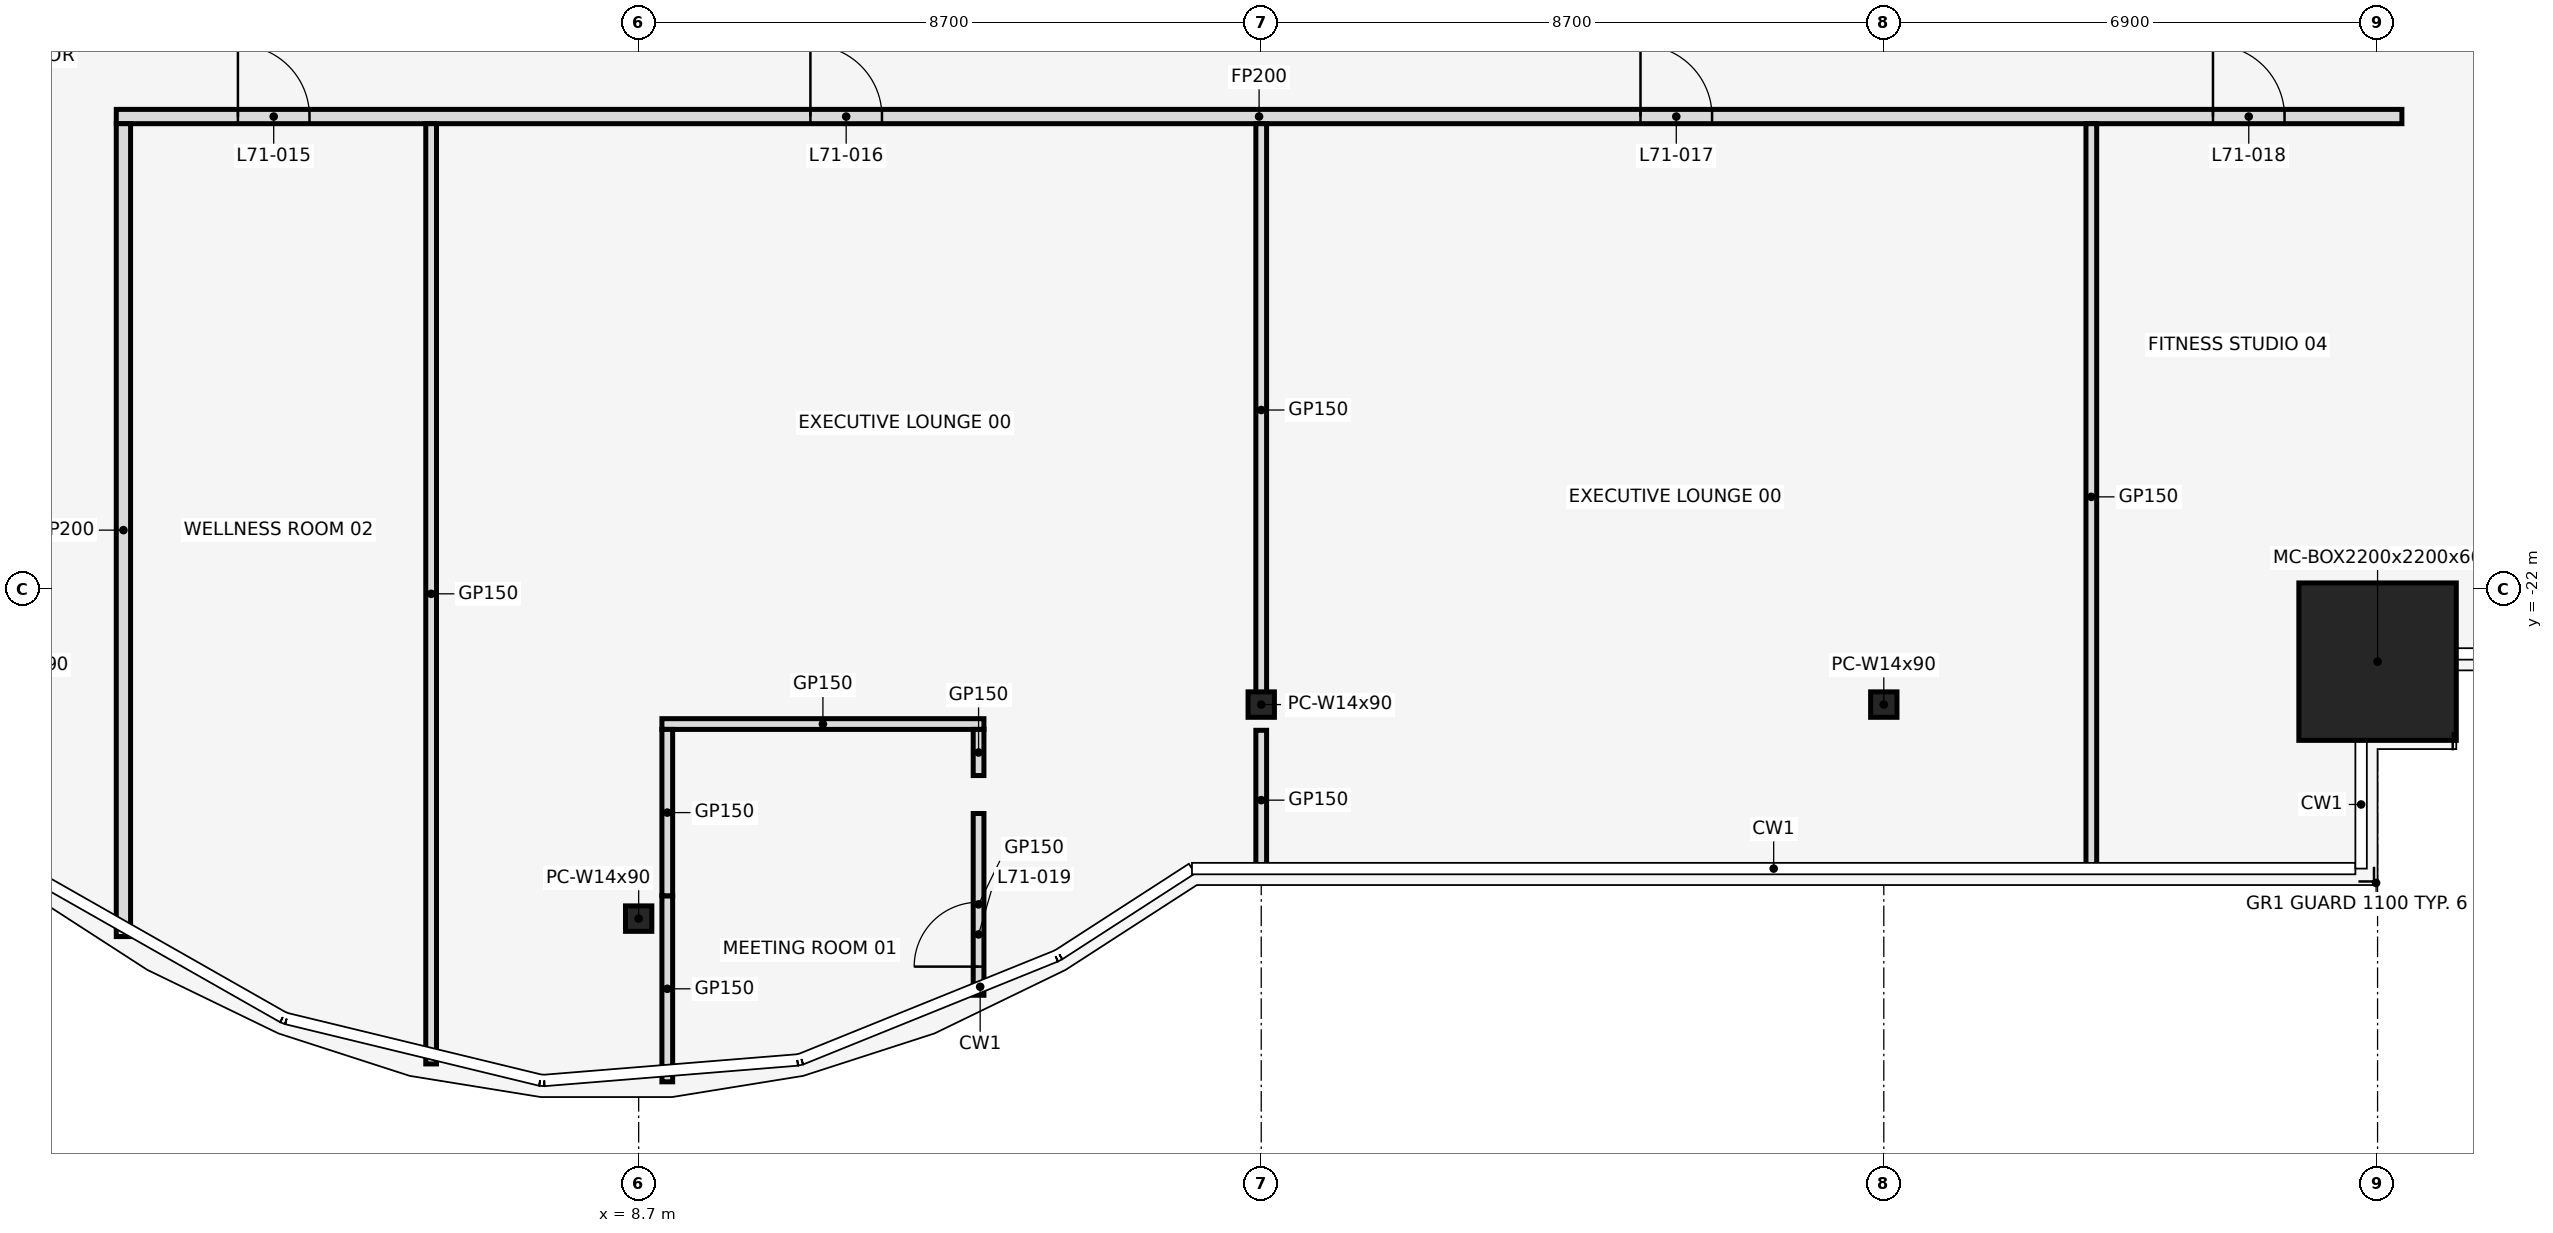
"""IFC4 building model, lengths in metres.
Left out: names, types, materials, properties, quantities, classifications, styles, units other than length and angle.
Written with IfcOpenShell. Run it as: python <this file> out.ifc"""

import sys

from ifc_helpers import new_model, si_unit, direction, frame, frame_2d, origin, origin_2d, place, context, subcontext, project, spatial, rectangle, hollow_rectangle, i_section, extrude, element, fill, save


model = new_model("IFC4")
c1 = context("Model", 3, precision=1e-05, world=origin(), true_north=direction((0.0, 1.0)))
c2 = subcontext(c1, "Body", "Model", "MODEL_VIEW")
j1 = project(units=[si_unit("LENGTHUNIT", "METRE"), si_unit("PLANEANGLEUNIT", "RADIAN")], contexts=[c1])
p1 = place(None, origin())
s1 = spatial("IfcSite", under=j1, at=p1, CompositionType="ELEMENT")
p2 = place(p1, origin())
s2 = spatial("IfcBuilding", under=s1, at=p2, CompositionType="ELEMENT")
p3 = place(p2, frame((0.0, 0.0, 315.5)))
s3 = spatial("IfcBuildingStorey", under=s2, at=p3, CompositionType="ELEMENT", Elevation=315.5)
for number, where, z_axis, x_axis in (
    (1, (8.7, -26.609, 0.0), (0.0, 0.0, 1.0), (1.0, 0.0, 0.0)),
    (2, (17.4, -23.618, 0.0), (0.0, 0.0, 1.0), (1.0, 0.0, 0.0)),
    (3, (26.1, -23.618, 0.0), (0.0, 0.0, 1.0), (1.0, 0.0, 0.0)),
):
    element("IfcColumn", number, at=place(p3, frame(where, z_axis=z_axis, x_axis=x_axis)), inside=s3, PredefinedType="COLUMN", context=c2, shape_type="SweptSolid", body=[
        extrude(i_section(OverallWidth=0.368, OverallDepth=0.356, WebThickness=0.011, FlangeThickness=0.018, at=origin_2d()), origin(), (0.0, 0.0, 1.0), 4.5),
    ])
p4 = place(p3, frame((33.0, -23.018, 0.0), z_axis=(0.0, 0.0, 1.0), x_axis=(1.0, 0.0, 0.0)))
e4 = element("IfcColumn", 4, at=p4, inside=s3, PredefinedType="COLUMN", context=c2, shape_type="SweptSolid", body=[
    extrude(hollow_rectangle(XDim=2.2, YDim=2.2, WallThickness=0.06, at=origin_2d()), origin(), (0.0, 0.0, 1.0), 4.5),
])
p5 = place(p3, frame((9.025, -23.89, 0.0), z_axis=(0.0, 0.0, 1.0), x_axis=(1.0, 0.0, 0.0)))
e5 = element("IfcWall", 5, at=p5, inside=s3, PredefinedType="PARTITIONING", context=c2, shape_type="SweptSolid", body=[
    extrude(rectangle(XDim=4.5, YDim=0.15, at=frame_2d((2.25, 0.0))), origin(), (0.0, 0.0, 1.0), 3.418),
])
p6 = place(p3, frame((1.4, -15.4, 0.0), z_axis=(0.0, 0.0, 1.0), x_axis=(1.0, 0.0, 0.0)))
e6 = element("IfcWall", 6, at=p6, inside=s3, PredefinedType="PARTITIONING", context=c2, shape_type="SweptSolid", body=[
    extrude(rectangle(XDim=31.94, YDim=0.2, at=frame_2d((15.97, 0.0))), origin(), (0.0, 0.0, 1.0), 3.418),
])
p7 = place(p6, frame((1.7, 0.0, 0.0)))
e7 = element("IfcOpeningElement", 7, at=p7, cuts=e6, PredefinedType="OPENING", context=c2, shape_type="SweptSolid", body=[
    extrude(rectangle(XDim=1.0, YDim=2.1, at=frame_2d((0.5, 1.05))), frame((0.0, 0.112, 0.0), z_axis=(0.0, -1.0, 0.0), x_axis=(1.0, 0.0, 0.0)), (0.0, 0.0, 1.0), 0.224),
])
p8 = place(p6, frame((9.7, 0.0, 0.0)))
e8 = element("IfcOpeningElement", 8, at=p8, cuts=e6, PredefinedType="OPENING", context=c2, shape_type="SweptSolid", body=[
    extrude(rectangle(XDim=1.0, YDim=2.1, at=frame_2d((0.5, 1.05))), frame((0.0, 0.112, 0.0), z_axis=(0.0, -1.0, 0.0), x_axis=(1.0, 0.0, 0.0)), (0.0, 0.0, 1.0), 0.224),
])
p9 = place(p6, frame((21.3, 0.0, 0.0)))
e9 = element("IfcOpeningElement", 9, at=p9, cuts=e6, PredefinedType="OPENING", context=c2, shape_type="SweptSolid", body=[
    extrude(rectangle(XDim=1.0, YDim=2.1, at=frame_2d((0.5, 1.05))), frame((0.0, 0.112, 0.0), z_axis=(0.0, -1.0, 0.0), x_axis=(1.0, 0.0, 0.0)), (0.0, 0.0, 1.0), 0.224),
])
p10 = place(p6, frame((29.3, 0.0, 0.0)))
e10 = element("IfcOpeningElement", 10, at=p10, cuts=e6, PredefinedType="OPENING", context=c2, shape_type="SweptSolid", body=[
    extrude(rectangle(XDim=1.0, YDim=2.1, at=frame_2d((0.5, 1.05))), frame((0.0, 0.112, 0.0), z_axis=(0.0, -1.0, 0.0), x_axis=(1.0, 0.0, 0.0)), (0.0, 0.0, 1.0), 0.224),
])
p11 = place(p3, frame((1.5, -26.86, 0.0), z_axis=(0.0, 0.0, 1.0), x_axis=(0.0, 1.0, 0.0)))
e11 = element("IfcWall", 11, at=p11, inside=s3, PredefinedType="PARTITIONING", context=c2, shape_type="SweptSolid", body=[
    extrude(rectangle(XDim=11.36, YDim=0.2, at=frame_2d((5.68, 0.0))), origin(), (0.0, 0.0, 1.0), 3.418),
])
p12 = place(p3, frame((5.8, -28.64, 0.0), z_axis=(0.0, 0.0, 1.0), x_axis=(0.0, 1.0, 0.0)))
e12 = element("IfcWall", 12, at=p12, inside=s3, PredefinedType="PARTITIONING", context=c2, shape_type="SweptSolid", body=[
    extrude(rectangle(XDim=13.14, YDim=0.15, at=frame_2d((6.57, 0.0))), origin(), (0.0, 0.0, 1.0), 3.418),
])
p13 = place(p3, frame((9.1, -28.89, 0.0), z_axis=(0.0, 0.0, 1.0), x_axis=(0.0, 1.0, 0.0)))
e13 = element("IfcWall", 13, at=p13, inside=s3, PredefinedType="PARTITIONING", context=c2, shape_type="SweptSolid", body=[
    extrude(rectangle(XDim=2.6, YDim=0.15, at=frame_2d((1.3, 0.0))), origin(), (0.0, 0.0, 1.0), 3.418),
])
p14 = place(p3, frame((9.1, -26.29, 0.0), z_axis=(0.0, 0.0, 1.0), x_axis=(0.0, 1.0, 0.0)))
e14 = element("IfcWall", 14, at=p14, inside=s3, PredefinedType="PARTITIONING", context=c2, shape_type="SweptSolid", body=[
    extrude(rectangle(XDim=2.325, YDim=0.15, at=frame_2d((1.163, 0.0))), origin(), (0.0, 0.0, 1.0), 3.418),
])
p15 = place(p3, frame((13.45, -27.68, 0.0), z_axis=(0.0, 0.0, 1.0), x_axis=(0.0, 1.0, 0.0)))
e15 = element("IfcWall", 15, at=p15, inside=s3, PredefinedType="PARTITIONING", context=c2, shape_type="SweptSolid", body=[
    extrude(rectangle(XDim=2.54, YDim=0.15, at=frame_2d((1.27, 0.0))), origin(), (0.0, 0.0, 1.0), 3.418),
])
p16 = place(p15, frame((0.4, 0.0, 0.0)))
e16 = element("IfcOpeningElement", 16, at=p16, cuts=e15, PredefinedType="OPENING", context=c2, shape_type="SweptSolid", body=[
    extrude(rectangle(XDim=0.9, YDim=2.1, at=frame_2d((0.45, 1.05))), frame((0.0, 0.087, 0.0), z_axis=(0.0, -1.0, 0.0), x_axis=(1.0, 0.0, 0.0)), (0.0, 0.0, 1.0), 0.174),
])
p17 = place(p3, frame((13.45, -24.61, 0.0), z_axis=(0.0, 0.0, 1.0), x_axis=(0.0, 1.0, 0.0)))
e17 = element("IfcWall", 17, at=p17, inside=s3, PredefinedType="PARTITIONING", context=c2, shape_type="SweptSolid", body=[
    extrude(rectangle(XDim=0.645, YDim=0.15, at=frame_2d((0.323, 0.0))), origin(), (0.0, 0.0, 1.0), 3.418),
])
p18 = place(p3, frame((17.4, -25.93, 0.0), z_axis=(0.0, 0.0, 1.0), x_axis=(0.0, 1.0, 0.0)))
e18 = element("IfcWall", 18, at=p18, inside=s3, PredefinedType="PARTITIONING", context=c2, shape_type="SweptSolid", body=[
    extrude(rectangle(XDim=1.953, YDim=0.15, at=frame_2d((0.976, 0.0))), origin(), (0.0, 0.0, 1.0), 3.418),
])
p19 = place(p3, frame((17.4, -23.503, 0.0), z_axis=(0.0, 0.0, 1.0), x_axis=(0.0, 1.0, 0.0)))
e19 = element("IfcWall", 19, at=p19, inside=s3, PredefinedType="PARTITIONING", context=c2, shape_type="SweptSolid", body=[
    extrude(rectangle(XDim=8.003, YDim=0.15, at=frame_2d((4.001, 0.0))), origin(), (0.0, 0.0, 1.0), 3.418),
])
p20 = place(p3, frame((29.0, -25.93, 0.0), z_axis=(0.0, 0.0, 1.0), x_axis=(0.0, 1.0, 0.0)))
e20 = element("IfcWall", 20, at=p20, inside=s3, PredefinedType="PARTITIONING", context=c2, shape_type="SweptSolid", body=[
    extrude(rectangle(XDim=10.43, YDim=0.15, at=frame_2d((5.215, 0.0))), origin(), (0.0, 0.0, 1.0), 3.418),
])
p21 = place(p7, frame((1.0, 0.0, 0.0), z_axis=(0.0, 0.0, 1.0), x_axis=(-1.0, 0.0, 0.0)))
e21 = element("IfcDoor", 21, at=p21, inside=s3, OperationType="SINGLE_SWING_RIGHT", PredefinedType="DOOR", context=c2, shape_type="SweptSolid", body=[
    extrude(rectangle(XDim=1.0, YDim=2.1, at=frame_2d((0.5, 1.05))), frame((0.0, 0.025, 0.0), z_axis=(0.0, -1.0, 0.0), x_axis=(1.0, 0.0, 0.0)), (0.0, 0.0, 1.0), 0.05),
])
fill(e7, e21)
p22 = place(p8, frame((1.0, 0.0, 0.0), z_axis=(0.0, 0.0, 1.0), x_axis=(-1.0, 0.0, 0.0)))
e22 = element("IfcDoor", 22, at=p22, inside=s3, OperationType="SINGLE_SWING_LEFT", PredefinedType="DOOR", context=c2, shape_type="SweptSolid", body=[
    extrude(rectangle(XDim=1.0, YDim=2.1, at=frame_2d((0.5, 1.05))), frame((0.0, 0.025, 0.0), z_axis=(0.0, -1.0, 0.0), x_axis=(1.0, 0.0, 0.0)), (0.0, 0.0, 1.0), 0.05),
])
fill(e8, e22)
p23 = place(p9, frame((1.0, 0.0, 0.0), z_axis=(0.0, 0.0, 1.0), x_axis=(-1.0, 0.0, 0.0)))
e23 = element("IfcDoor", 23, at=p23, inside=s3, OperationType="SINGLE_SWING_RIGHT", PredefinedType="DOOR", context=c2, shape_type="SweptSolid", body=[
    extrude(rectangle(XDim=1.0, YDim=2.1, at=frame_2d((0.5, 1.05))), frame((0.0, 0.025, 0.0), z_axis=(0.0, -1.0, 0.0), x_axis=(1.0, 0.0, 0.0)), (0.0, 0.0, 1.0), 0.05),
])
fill(e9, e23)
p24 = place(p10, frame((1.0, 0.0, 0.0), z_axis=(0.0, 0.0, 1.0), x_axis=(-1.0, 0.0, 0.0)))
e24 = element("IfcDoor", 24, at=p24, inside=s3, OperationType="SINGLE_SWING_RIGHT", PredefinedType="DOOR", context=c2, shape_type="SweptSolid", body=[
    extrude(rectangle(XDim=1.0, YDim=2.1, at=frame_2d((0.5, 1.05))), frame((0.0, 0.025, 0.0), z_axis=(0.0, -1.0, 0.0), x_axis=(1.0, 0.0, 0.0)), (0.0, 0.0, 1.0), 0.05),
])
fill(e10, e24)
p25 = place(p16, origin())
e25 = element("IfcDoor", 25, at=p25, inside=s3, OperationType="SINGLE_SWING_LEFT", PredefinedType="DOOR", context=c2, shape_type="SweptSolid", body=[
    extrude(rectangle(XDim=0.9, YDim=2.1, at=frame_2d((0.45, 1.05))), frame((0.0, 0.025, 0.0), z_axis=(0.0, -1.0, 0.0), x_axis=(1.0, 0.0, 0.0)), (0.0, 0.0, 1.0), 0.05),
])
fill(e16, e25)
save(model, sys.argv[1])
